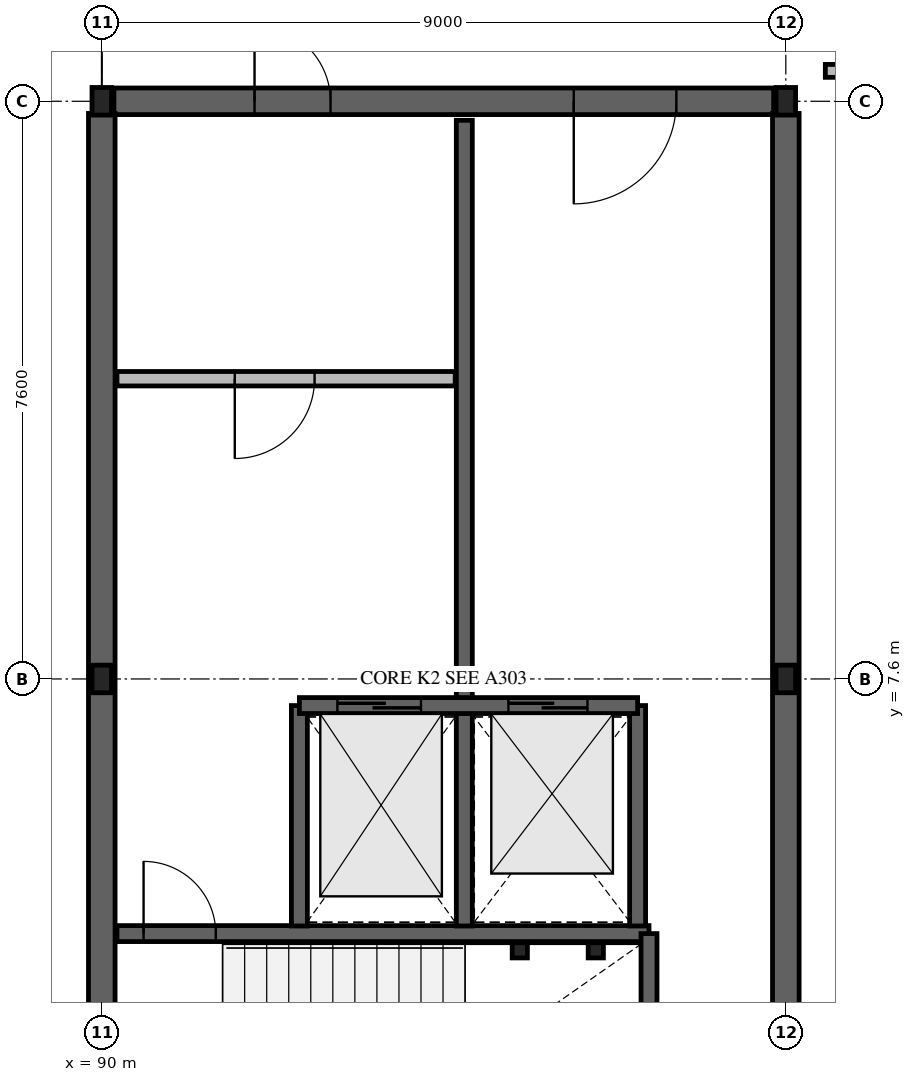
"""IFC4 building model, lengths in metres.
Left out: names, types, materials, properties, quantities, classifications, styles, units other than length and angle.
Written with IfcOpenShell. Run it as: python <this file> out.ifc"""

import sys

from ifc_helpers import new_model, si_unit, direction, frame, frame_2d, origin, origin_2d, place, context, subcontext, project, spatial, rectangle, hollow_rectangle, i_section, extrude, element, fill, save


model = new_model("IFC4")
c1 = context("Model", 3, precision=1e-05, world=origin(), true_north=direction((0.0, 1.0)))
c2 = subcontext(c1, "Body", "Model", "MODEL_VIEW")
j1 = project(units=[si_unit("LENGTHUNIT", "METRE"), si_unit("PLANEANGLEUNIT", "RADIAN")], contexts=[c1])
p1 = place(None, origin())
s1 = spatial("IfcSite", under=j1, at=p1, CompositionType="ELEMENT")
p2 = place(p1, origin())
s2 = spatial("IfcBuilding", under=s1, at=p2, CompositionType="ELEMENT")
p3 = place(p2, frame((0.0, 0.0, 13.68)))
s3 = spatial("IfcBuildingStorey", under=s2, at=p3, CompositionType="ELEMENT", Elevation=13.68)
for number, where, z_axis, x_axis in (
    (1, (90.0, 7.6, 0.0), (0.0, 0.0, 1.0), (1.0, 0.0, 0.0)),
    (2, (90.0, 15.2, 0.0), (0.0, 0.0, 1.0), (1.0, 0.0, 0.0)),
    (3, (99.0, 7.6, 0.0), (0.0, 0.0, 1.0), (1.0, 0.0, 0.0)),
    (4, (99.0, 15.2, 0.0), (0.0, 0.0, 1.0), (1.0, 0.0, 0.0)),
):
    element("IfcColumn", number, at=place(p3, frame(where, z_axis=z_axis, x_axis=x_axis)), inside=s3, PredefinedType="COLUMN", context=c2, shape_type="SweptSolid", body=[
        extrude(i_section(OverallWidth=0.257, OverallDepth=0.363, WebThickness=0.013, FlangeThickness=0.022, FilletRadius=0.015, at=origin_2d()), origin(), (0.0, 0.0, 1.0), 4.32),
    ])
p4 = place(p3, frame((90.16, 15.2, 0.0), z_axis=(0.0, 0.0, 1.0), x_axis=(1.0, 0.0, 0.0)))
e5 = element("IfcWall", 5, at=p4, inside=s3, PredefinedType="SHEAR", context=c2, shape_type="SweptSolid", body=[
    extrude(rectangle(XDim=8.68, YDim=0.35, at=frame_2d((4.34, 0.0))), origin(), (0.0, 0.0, 1.0), 4.04),
])
p5 = place(p4, frame((1.85, 0.0, 0.0)))
e6 = element("IfcOpeningElement", 6, at=p5, cuts=e5, PredefinedType="OPENING", context=c2, shape_type="SweptSolid", body=[
    extrude(rectangle(XDim=1.0, YDim=2.15, at=frame_2d((0.5, 1.075))), frame((0.0, 0.185, 0.0), z_axis=(0.0, -1.0, 0.0), x_axis=(1.0, 0.0, 0.0)), (0.0, 0.0, 1.0), 0.37),
])
p6 = place(p4, frame((6.05, 0.0, 0.0)))
e7 = element("IfcOpeningElement", 7, at=p6, cuts=e5, PredefinedType="OPENING", context=c2, shape_type="SweptSolid", body=[
    extrude(rectangle(XDim=1.35, YDim=2.18, at=frame_2d((0.675, 1.09))), frame((0.0, 0.185, 0.0), z_axis=(0.0, -1.0, 0.0), x_axis=(1.0, 0.0, 0.0)), (0.0, 0.0, 1.0), 0.37),
])
for number, where, z_axis, x_axis in (
    (8, (90.0, 0.16, 0.0), (0.0, 0.0, 1.0), (0.0, 1.0, 0.0)),
    (9, (99.0, 0.16, 0.0), (0.0, 0.0, 1.0), (0.0, 1.0, 0.0)),
):
    element("IfcWall", number, at=place(p3, frame(where, z_axis=z_axis, x_axis=x_axis)), inside=s3, PredefinedType="SHEAR", context=c2, shape_type="SweptSolid", body=[
        extrude(rectangle(XDim=14.88, YDim=0.35, at=frame_2d((7.44, 0.0))), origin(), (0.0, 0.0, 1.0), 4.04),
    ])
p7 = place(p3, frame((90.2, 4.25, 0.0), z_axis=(0.0, 0.0, 1.0), x_axis=(1.0, 0.0, 0.0)))
e10 = element("IfcWall", 10, at=p7, inside=s3, PredefinedType="SOLIDWALL", context=c2, shape_type="SweptSolid", body=[
    extrude(rectangle(XDim=7.0, YDim=0.21, at=frame_2d((3.5, 0.0))), origin(), (0.0, 0.0, 1.0), 4.04),
])
p8 = place(p7, frame((0.35, 0.0, 0.0)))
e11 = element("IfcOpeningElement", 11, at=p8, cuts=e10, PredefinedType="OPENING", context=c2, shape_type="SweptSolid", body=[
    extrude(rectangle(XDim=0.95, YDim=2.12, at=frame_2d((0.475, 1.06))), frame((0.0, 0.115, 0.0), z_axis=(0.0, -1.0, 0.0), x_axis=(1.0, 0.0, 0.0)), (0.0, 0.0, 1.0), 0.23),
])
p9 = place(p3, frame((97.2, 0.2, 0.0), z_axis=(0.0, 0.0, 1.0), x_axis=(0.0, 1.0, 0.0)))
e12 = element("IfcWall", 12, at=p9, inside=s3, PredefinedType="SOLIDWALL", context=c2, shape_type="SweptSolid", body=[
    extrude(rectangle(XDim=4.05, YDim=0.21, at=frame_2d((2.025, 0.0))), origin(), (0.0, 0.0, 1.0), 4.04),
])
p10 = place(p3, frame((92.6, 4.35, 0.0), z_axis=(0.0, 0.0, 1.0), x_axis=(0.0, 1.0, 0.0)))
e13 = element("IfcWall", 13, at=p10, inside=s3, PredefinedType="SOLIDWALL", context=c2, shape_type="SweptSolid", body=[
    extrude(rectangle(XDim=2.9, YDim=0.21, at=frame_2d((1.45, 0.0))), origin(), (0.0, 0.0, 1.0), 4.04),
])
p11 = place(p3, frame((94.77, 4.35, 0.0), z_axis=(0.0, 0.0, 1.0), x_axis=(0.0, 1.0, 0.0)))
e14 = element("IfcWall", 14, at=p11, inside=s3, PredefinedType="SOLIDWALL", context=c2, shape_type="SweptSolid", body=[
    extrude(rectangle(XDim=10.6, YDim=0.21, at=frame_2d((5.3, 0.0))), origin(), (0.0, 0.0, 1.0), 4.04),
])
p12 = place(p3, frame((97.05, 4.35, 0.0), z_axis=(0.0, 0.0, 1.0), x_axis=(0.0, 1.0, 0.0)))
e15 = element("IfcWall", 15, at=p12, inside=s3, PredefinedType="SOLIDWALL", context=c2, shape_type="SweptSolid", body=[
    extrude(rectangle(XDim=2.9, YDim=0.21, at=frame_2d((1.45, 0.0))), origin(), (0.0, 0.0, 1.0), 4.04),
])
p13 = place(p3, frame((92.6, 7.25, 0.0), z_axis=(0.0, 0.0, 1.0), x_axis=(1.0, 0.0, 0.0)))
e16 = element("IfcWall", 16, at=p13, inside=s3, PredefinedType="SOLIDWALL", context=c2, shape_type="SweptSolid", body=[
    extrude(rectangle(XDim=4.45, YDim=0.21, at=frame_2d((2.225, 0.0))), origin(), (0.0, 0.0, 1.0), 4.04),
])
p14 = place(p13, frame((0.5, 0.0, 0.0)))
e17 = element("IfcOpeningElement", 17, at=p14, cuts=e16, PredefinedType="OPENING", context=c2, shape_type="SweptSolid", body=[
    extrude(rectangle(XDim=1.1, YDim=2.14, at=frame_2d((0.55, 1.07))), frame((0.0, 0.115, 0.0), z_axis=(0.0, -1.0, 0.0), x_axis=(1.0, 0.0, 0.0)), (0.0, 0.0, 1.0), 0.23),
])
p15 = place(p13, frame((2.75, 0.0, 0.0)))
e18 = element("IfcOpeningElement", 18, at=p15, cuts=e16, PredefinedType="OPENING", context=c2, shape_type="SweptSolid", body=[
    extrude(rectangle(XDim=1.04, YDim=2.1, at=frame_2d((0.52, 1.05))), frame((0.0, 0.115, 0.0), z_axis=(0.0, -1.0, 0.0), x_axis=(1.0, 0.0, 0.0)), (0.0, 0.0, 1.0), 0.23),
])
p16 = place(p3, frame((90.2, 11.55, 0.0), z_axis=(0.0, 0.0, 1.0), x_axis=(1.0, 0.0, 0.0)))
e19 = element("IfcWall", 19, at=p16, inside=s3, PredefinedType="SOLIDWALL", context=c2, shape_type="SweptSolid", body=[
    extrude(rectangle(XDim=4.45, YDim=0.19, at=frame_2d((2.225, 0.0))), origin(), (0.0, 0.0, 1.0), 4.04),
])
p17 = place(p16, frame((1.55, 0.0, 0.0)))
e20 = element("IfcOpeningElement", 20, at=p17, cuts=e19, PredefinedType="OPENING", context=c2, shape_type="SweptSolid", body=[
    extrude(rectangle(XDim=1.05, YDim=2.12, at=frame_2d((0.525, 1.06))), frame((0.0, 0.105, 0.0), z_axis=(0.0, -1.0, 0.0), x_axis=(1.0, 0.0, 0.0)), (0.0, 0.0, 1.0), 0.21),
])
for number, where, z_axis, x_axis in (
    (21, (95.5, 4.03, 0.0), (0.0, 0.0, 1.0), (1.0, 0.0, 0.0)),
    (22, (96.5, 4.03, 0.0), (0.0, 0.0, 1.0), (1.0, 0.0, 0.0)),
):
    element("IfcColumn", number, at=place(p3, frame(where, z_axis=z_axis, x_axis=x_axis)), inside=s3, PredefinedType="COLUMN", context=c2, shape_type="SweptSolid", body=[
        extrude(hollow_rectangle(XDim=0.2, YDim=0.2, WallThickness=0.012, at=origin_2d()), origin(), (0.0, 0.0, 1.0), 4.32),
    ])
p18 = place(p3, frame((99.52, 15.6, 0.0), z_axis=(0.0, 0.0, 1.0), x_axis=(1.0, 0.0, 0.0)))
e23 = element("IfcWall", 23, at=p18, inside=s3, PredefinedType="PARTITIONING", context=c2, shape_type="SweptSolid", body=[
    extrude(rectangle(XDim=7.96, YDim=0.17, at=frame_2d((3.98, 0.0))), origin(), (0.0, 0.0, 1.0), 4.04),
])
p19 = place(p18, frame((3.355, 0.0, 0.0)))
e24 = element("IfcOpeningElement", 24, at=p19, cuts=e23, PredefinedType="OPENING", context=c2, shape_type="SweptSolid", body=[
    extrude(rectangle(XDim=1.25, YDim=2.18, at=frame_2d((0.625, 1.09))), frame((0.0, 0.095, 0.0), z_axis=(0.0, -1.0, 0.0), x_axis=(1.0, 0.0, 0.0)), (0.0, 0.0, 1.0), 0.19),
])
p20 = place(p18, frame((1.805, 0.0, 0.0)))
e25 = element("IfcOpeningElement", 25, at=p20, cuts=e23, PredefinedType="OPENING", context=c2, shape_type="SweptSolid", body=[
    extrude(rectangle(XDim=1.15, YDim=2.15, at=frame_2d((0.575, 1.075))), frame((0.0, 0.095, 0.0), z_axis=(0.0, -1.0, 0.0), x_axis=(1.0, 0.0, 0.0)), (0.0, 0.0, 1.0), 0.19),
])
p21 = place(p8, origin())
e26 = element("IfcDoor", 26, at=p21, inside=s3, OperationType="SINGLE_SWING_LEFT", PredefinedType="DOOR", context=c2, shape_type="SweptSolid", body=[
    extrude(rectangle(XDim=0.95, YDim=2.12, at=frame_2d((0.475, 1.06))), frame((0.0, 0.025, 0.0), z_axis=(0.0, -1.0, 0.0), x_axis=(1.0, 0.0, 0.0)), (0.0, 0.0, 1.0), 0.05),
])
fill(e11, e26)
p22 = place(p14, origin())
e27 = element("IfcDoor", 27, at=p22, inside=s3, OperationType="SLIDING_TO_LEFT", PredefinedType="DOOR", context=c2, shape_type="SweptSolid", body=[
    extrude(rectangle(XDim=1.1, YDim=2.14, at=frame_2d((0.55, 1.07))), frame((0.0, 0.025, 0.0), z_axis=(0.0, -1.0, 0.0), x_axis=(1.0, 0.0, 0.0)), (0.0, 0.0, 1.0), 0.05),
])
fill(e17, e27)
p23 = place(p15, origin())
e28 = element("IfcDoor", 28, at=p23, inside=s3, OperationType="SLIDING_TO_LEFT", PredefinedType="DOOR", context=c2, shape_type="SweptSolid", body=[
    extrude(rectangle(XDim=1.04, YDim=2.1, at=frame_2d((0.52, 1.05))), frame((0.0, 0.025, 0.0), z_axis=(0.0, -1.0, 0.0), x_axis=(1.0, 0.0, 0.0)), (0.0, 0.0, 1.0), 0.05),
])
fill(e18, e28)
p24 = place(p17, origin())
e29 = element("IfcDoor", 29, at=p24, inside=s3, OperationType="SINGLE_SWING_RIGHT", PredefinedType="DOOR", context=c2, shape_type="SweptSolid", body=[
    extrude(rectangle(XDim=1.05, YDim=2.12, at=frame_2d((0.525, 1.06))), frame((0.0, 0.025, 0.0), z_axis=(0.0, -1.0, 0.0), x_axis=(1.0, 0.0, 0.0)), (0.0, 0.0, 1.0), 0.05),
])
fill(e20, e29)
p25 = place(p5, origin())
e30 = element("IfcDoor", 30, at=p25, inside=s3, OperationType="SINGLE_SWING_LEFT", PredefinedType="DOOR", context=c2, shape_type="SweptSolid", body=[
    extrude(rectangle(XDim=1.0, YDim=2.15, at=frame_2d((0.5, 1.075))), frame((0.0, 0.025, 0.0), z_axis=(0.0, -1.0, 0.0), x_axis=(1.0, 0.0, 0.0)), (0.0, 0.0, 1.0), 0.05),
])
fill(e6, e30)
p26 = place(p6, origin())
e31 = element("IfcDoor", 31, at=p26, inside=s3, OperationType="SINGLE_SWING_RIGHT", PredefinedType="DOOR", context=c2, shape_type="SweptSolid", body=[
    extrude(rectangle(XDim=1.35, YDim=2.18, at=frame_2d((0.675, 1.09))), frame((0.0, 0.025, 0.0), z_axis=(0.0, -1.0, 0.0), x_axis=(1.0, 0.0, 0.0)), (0.0, 0.0, 1.0), 0.05),
])
fill(e7, e31)
save(model, sys.argv[1])
